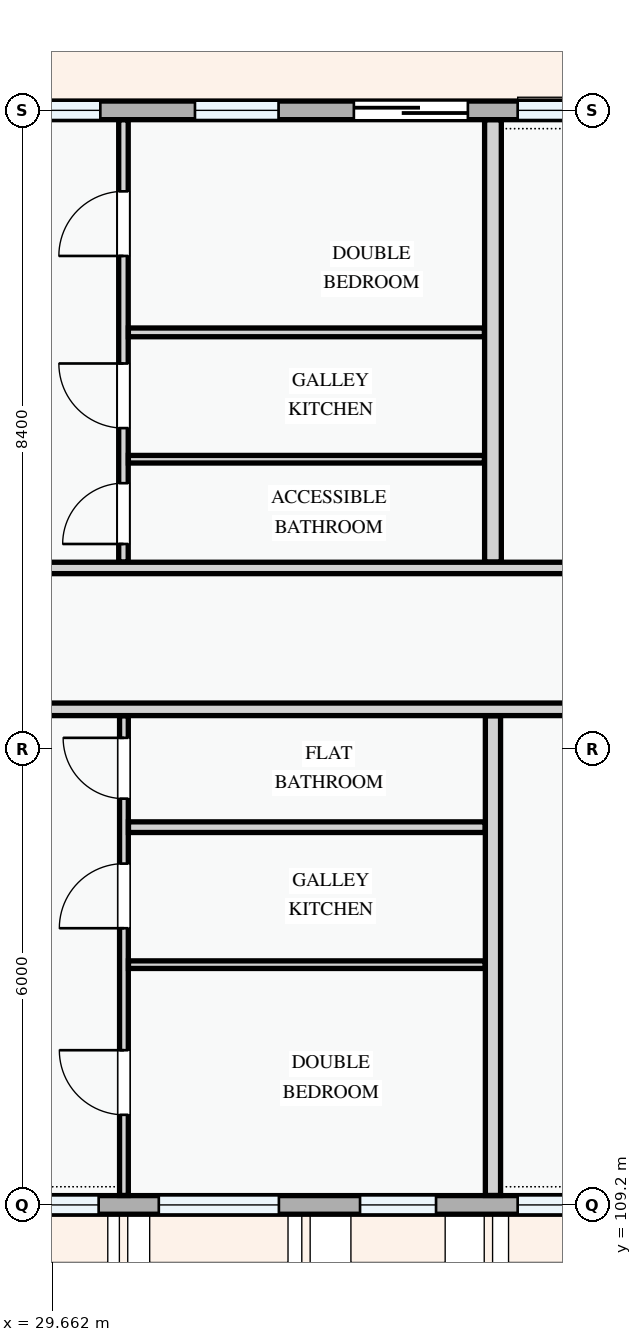
"""IFC4 building model, lengths in metres.
Left out: names, types, materials, properties, quantities, classifications, styles, units other than length and angle.
Written with IfcOpenShell. Run it as: python <this file> out.ifc"""

import sys

from ifc_helpers import new_model, si_unit, direction, frame, frame_2d, origin, place, context, subcontext, project, spatial, rectangle, extrude, element, fill, save


model = new_model("IFC4")
c1 = context("Model", 3, precision=1e-05, world=origin(), true_north=direction((0.0, 1.0)))
c2 = subcontext(c1, "Body", "Model", "MODEL_VIEW")
j1 = project(units=[si_unit("LENGTHUNIT", "METRE"), si_unit("PLANEANGLEUNIT", "RADIAN")], contexts=[c1])
p1 = place(None, origin())
s1 = spatial("IfcSite", under=j1, at=p1, CompositionType="ELEMENT")
p2 = place(p1, origin())
s2 = spatial("IfcBuilding", under=s1, at=p2, CompositionType="ELEMENT")
p3 = place(p2, frame((0.0, 0.0, 8.1)))
s3 = spatial("IfcBuildingStorey", under=s2, at=p3, CompositionType="ELEMENT", Elevation=8.1)
p4 = place(p3, frame((28.8, 109.2, 0.0), z_axis=(0.0, 0.0, 1.0), x_axis=(1.0, 0.0, 0.0)))
e1 = element("IfcWall", 1, at=p4, inside=s3, PredefinedType="STANDARD", context=c2, shape_type="SweptSolid", body=[
    extrude(rectangle(XDim=8.4, YDim=0.245, at=frame_2d((4.2, 0.0))), origin(), (0.0, 0.0, 1.0), 2.375),
])
p5 = place(p4, frame((0.522, 0.0, 0.78)))
e2 = element("IfcOpeningElement", 2, at=p5, cuts=e1, PredefinedType="OPENING", context=c2, shape_type="SweptSolid", body=[
    extrude(rectangle(XDim=0.95, YDim=1.15, at=frame_2d((0.475, 0.575))), frame((0.0, 0.133, 0.0), z_axis=(0.0, -1.0, 0.0), x_axis=(1.0, 0.0, 0.0)), (0.0, 0.0, 1.0), 0.265),
])
p6 = place(p4, frame((2.264, 0.0, 0.78)))
e3 = element("IfcOpeningElement", 3, at=p6, cuts=e1, PredefinedType="OPENING", context=c2, shape_type="SweptSolid", body=[
    extrude(rectangle(XDim=1.58, YDim=1.48, at=frame_2d((0.79, 0.74))), frame((0.0, 0.133, 0.0), z_axis=(0.0, -1.0, 0.0), x_axis=(1.0, 0.0, 0.0)), (0.0, 0.0, 1.0), 0.265),
])
p7 = place(p4, frame((4.911, 0.0, 0.78)))
e4 = element("IfcOpeningElement", 4, at=p7, cuts=e1, PredefinedType="OPENING", context=c2, shape_type="SweptSolid", body=[
    extrude(rectangle(XDim=1.0, YDim=1.25, at=frame_2d((0.5, 0.625))), frame((0.0, 0.133, 0.0), z_axis=(0.0, -1.0, 0.0), x_axis=(1.0, 0.0, 0.0)), (0.0, 0.0, 1.0), 0.265),
])
p8 = place(p4, frame((6.985, 0.0, 0.78)))
e5 = element("IfcOpeningElement", 5, at=p8, cuts=e1, PredefinedType="OPENING", context=c2, shape_type="SweptSolid", body=[
    extrude(rectangle(XDim=0.9, YDim=1.2, at=frame_2d((0.45, 0.6))), frame((0.0, 0.133, 0.0), z_axis=(0.0, -1.0, 0.0), x_axis=(1.0, 0.0, 0.0)), (0.0, 0.0, 1.0), 0.265),
])
p9 = place(p3, frame((37.2, 123.6, 0.0), z_axis=(0.0, 0.0, 1.0), x_axis=(-1.0, 0.0, 0.0)))
e6 = element("IfcWall", 6, at=p9, inside=s3, PredefinedType="STANDARD", context=c2, shape_type="SweptSolid", body=[
    extrude(rectangle(XDim=8.4, YDim=0.245, at=frame_2d((4.2, 0.0))), origin(), (0.0, 0.0, 1.0), 2.345),
])
p10 = place(p9, frame((2.07, 0.0, 0.0)))
e7 = element("IfcOpeningElement", 7, at=p10, cuts=e6, PredefinedType="OPENING", context=c2, shape_type="SweptSolid", body=[
    extrude(rectangle(XDim=1.5, YDim=2.2, at=frame_2d((0.75, 1.1))), frame((0.0, 0.133, 0.0), z_axis=(0.0, -1.0, 0.0), x_axis=(1.0, 0.0, 0.0)), (0.0, 0.0, 1.0), 0.265),
])
p11 = place(p9, frame((0.515, 0.0, 0.78)))
e8 = element("IfcOpeningElement", 8, at=p11, cuts=e6, PredefinedType="OPENING", context=c2, shape_type="SweptSolid", body=[
    extrude(rectangle(XDim=0.9, YDim=1.2, at=frame_2d((0.45, 0.6))), frame((0.0, 0.133, 0.0), z_axis=(0.0, -1.0, 0.0), x_axis=(1.0, 0.0, 0.0)), (0.0, 0.0, 1.0), 0.265),
])
p12 = place(p9, frame((4.561, 0.0, 0.78)))
e9 = element("IfcOpeningElement", 9, at=p12, cuts=e6, PredefinedType="OPENING", context=c2, shape_type="SweptSolid", body=[
    extrude(rectangle(XDim=1.1, YDim=1.3, at=frame_2d((0.55, 0.65))), frame((0.0, 0.133, 0.0), z_axis=(0.0, -1.0, 0.0), x_axis=(1.0, 0.0, 0.0)), (0.0, 0.0, 1.0), 0.265),
])
p13 = place(p9, frame((6.906, 0.0, 0.78)))
e10 = element("IfcOpeningElement", 10, at=p13, cuts=e6, PredefinedType="OPENING", context=c2, shape_type="SweptSolid", body=[
    extrude(rectangle(XDim=1.0, YDim=1.25, at=frame_2d((0.5, 0.625))), frame((0.0, 0.133, 0.0), z_axis=(0.0, -1.0, 0.0), x_axis=(1.0, 0.0, 0.0)), (0.0, 0.0, 1.0), 0.265),
])
p14 = place(p3, frame((30.605, 109.324, 0.0), z_axis=(0.0, 0.0, 1.0), x_axis=(0.0, 1.0, 0.0)))
e11 = element("IfcWall", 11, at=p14, inside=s3, PredefinedType="PARTITIONING", context=c2, shape_type="SweptSolid", body=[
    extrude(rectangle(XDim=6.311, YDim=0.115, at=frame_2d((3.156, 0.0))), origin(), (0.0, 0.0, 1.0), 3.0),
])
p15 = place(p14, frame((1.061, 0.0, 0.0)))
e12 = element("IfcOpeningElement", 12, at=p15, cuts=e11, PredefinedType="OPENING", context=c2, shape_type="SweptSolid", body=[
    extrude(rectangle(XDim=0.85, YDim=2.1, at=frame_2d((0.425, 1.05))), frame((0.0, 0.067, 0.0), z_axis=(0.0, -1.0, 0.0), x_axis=(1.0, 0.0, 0.0)), (0.0, 0.0, 1.0), 0.135),
])
p16 = place(p14, frame((3.516, 0.0, 0.0)))
e13 = element("IfcOpeningElement", 13, at=p16, cuts=e11, PredefinedType="OPENING", context=c2, shape_type="SweptSolid", body=[
    extrude(rectangle(XDim=0.85, YDim=2.1, at=frame_2d((0.425, 1.05))), frame((0.0, 0.067, 0.0), z_axis=(0.0, -1.0, 0.0), x_axis=(1.0, 0.0, 0.0)), (0.0, 0.0, 1.0), 0.135),
])
p17 = place(p14, frame((5.22, 0.0, 0.0)))
e14 = element("IfcOpeningElement", 14, at=p17, cuts=e11, PredefinedType="OPENING", context=c2, shape_type="SweptSolid", body=[
    extrude(rectangle(XDim=0.8, YDim=2.1, at=frame_2d((0.4, 1.05))), frame((0.0, 0.067, 0.0), z_axis=(0.0, -1.0, 0.0), x_axis=(1.0, 0.0, 0.0)), (0.0, 0.0, 1.0), 0.135),
])
p18 = place(p3, frame((30.665, 112.361, 0.0), z_axis=(0.0, 0.0, 1.0), x_axis=(1.0, 0.0, 0.0)))
e15 = element("IfcWall", 15, at=p18, inside=s3, PredefinedType="PARTITIONING", context=c2, shape_type="SweptSolid", body=[
    extrude(rectangle(XDim=4.693, YDim=0.1, at=frame_2d((2.347, 0.0))), origin(), (0.0, 0.0, 1.0), 3.0),
])
p19 = place(p3, frame((30.665, 114.17, 0.0), z_axis=(0.0, 0.0, 1.0), x_axis=(1.0, 0.0, 0.0)))
e16 = element("IfcWall", 16, at=p19, inside=s3, PredefinedType="PARTITIONING", context=c2, shape_type="SweptSolid", body=[
    extrude(rectangle(XDim=4.693, YDim=0.14, at=frame_2d((2.347, 0.0))), origin(), (0.0, 0.0, 1.0), 3.0),
])
p20 = place(p3, frame((30.599, 117.657, 0.0), z_axis=(0.0, 0.0, 1.0), x_axis=(0.0, 1.0, 0.0)))
e17 = element("IfcWall", 17, at=p20, inside=s3, PredefinedType="PARTITIONING", context=c2, shape_type="SweptSolid", body=[
    extrude(rectangle(XDim=5.819, YDim=0.125, at=frame_2d((2.909, 0.0))), origin(), (0.0, 0.0, 1.0), 3.0),
])
p21 = place(p20, frame((0.238, 0.0, 0.0)))
e18 = element("IfcOpeningElement", 18, at=p21, cuts=e17, PredefinedType="OPENING", context=c2, shape_type="SweptSolid", body=[
    extrude(rectangle(XDim=0.8, YDim=2.1, at=frame_2d((0.4, 1.05))), frame((0.0, 0.073, 0.0), z_axis=(0.0, -1.0, 0.0), x_axis=(1.0, 0.0, 0.0)), (0.0, 0.0, 1.0), 0.145),
])
p22 = place(p20, frame((1.763, 0.0, 0.0)))
e19 = element("IfcOpeningElement", 19, at=p22, cuts=e17, PredefinedType="OPENING", context=c2, shape_type="SweptSolid", body=[
    extrude(rectangle(XDim=0.85, YDim=2.1, at=frame_2d((0.425, 1.05))), frame((0.0, 0.073, 0.0), z_axis=(0.0, -1.0, 0.0), x_axis=(1.0, 0.0, 0.0)), (0.0, 0.0, 1.0), 0.145),
])
p23 = place(p20, frame((4.028, 0.0, 0.0)))
e20 = element("IfcOpeningElement", 20, at=p23, cuts=e17, PredefinedType="OPENING", context=c2, shape_type="SweptSolid", body=[
    extrude(rectangle(XDim=0.85, YDim=2.1, at=frame_2d((0.425, 1.05))), frame((0.0, 0.073, 0.0), z_axis=(0.0, -1.0, 0.0), x_axis=(1.0, 0.0, 0.0)), (0.0, 0.0, 1.0), 0.145),
])
p24 = place(p3, frame((30.663, 120.679, 0.0), z_axis=(0.0, 0.0, 1.0), x_axis=(1.0, 0.0, 0.0)))
e21 = element("IfcWall", 21, at=p24, inside=s3, PredefinedType="PARTITIONING", context=c2, shape_type="SweptSolid", body=[
    extrude(rectangle(XDim=4.685, YDim=0.115, at=frame_2d((2.342, 0.0))), origin(), (0.0, 0.0, 1.0), 3.0),
])
p25 = place(p3, frame((30.663, 119.01, 0.0), z_axis=(0.0, 0.0, 1.0), x_axis=(1.0, 0.0, 0.0)))
e22 = element("IfcWall", 22, at=p25, inside=s3, PredefinedType="PARTITIONING", context=c2, shape_type="SweptSolid", body=[
    extrude(rectangle(XDim=4.685, YDim=0.1, at=frame_2d((2.342, 0.0))), origin(), (0.0, 0.0, 1.0), 3.0),
])
p26 = place(p3, frame((35.46, 109.324, 0.0), z_axis=(0.0, 0.0, 1.0), x_axis=(0.0, 1.0, 0.0)))
e23 = element("IfcWall", 23, at=p26, inside=s3, PredefinedType="PARTITIONING", context=c2, shape_type="SweptSolid", body=[
    extrude(rectangle(XDim=6.311, YDim=0.2, at=frame_2d((3.156, 0.0))), origin(), (0.0, 0.0, 1.0), 3.0),
])
p27 = place(p3, frame((35.46, 117.657, 0.0), z_axis=(0.0, 0.0, 1.0), x_axis=(0.0, 1.0, 0.0)))
e24 = element("IfcWall", 24, at=p27, inside=s3, PredefinedType="PARTITIONING", context=c2, shape_type="SweptSolid", body=[
    extrude(rectangle(XDim=5.819, YDim=0.22, at=frame_2d((2.909, 0.0))), origin(), (0.0, 0.0, 1.0), 3.0),
])
p28 = place(p3, frame((25.15, 115.72, 0.0), z_axis=(0.0, 0.0, 1.0), x_axis=(1.0, 0.0, 0.0)))
e25 = element("IfcWall", 25, at=p28, inside=s3, PredefinedType="PARTITIONING", context=c2, shape_type="SweptSolid", body=[
    extrude(rectangle(XDim=32.326, YDim=0.165, at=frame_2d((16.163, 0.0))), origin(), (0.0, 0.0, 1.0), 3.0),
])
p29 = place(p28, frame((0.25, 0.0, 0.0)))
e26 = element("IfcOpeningElement", 26, at=p29, cuts=e25, PredefinedType="OPENING", context=c2, shape_type="SweptSolid", body=[
    extrude(rectangle(XDim=0.92, YDim=2.1, at=frame_2d((0.46, 1.05))), frame((0.0, 0.093, 0.0), z_axis=(0.0, -1.0, 0.0), x_axis=(1.0, 0.0, 0.0)), (0.0, 0.0, 1.0), 0.185),
])
p30 = place(p28, frame((14.548, 0.0, 0.0)))
e27 = element("IfcOpeningElement", 27, at=p30, cuts=e25, PredefinedType="OPENING", context=c2, shape_type="SweptSolid", body=[
    extrude(rectangle(XDim=0.92, YDim=2.1, at=frame_2d((0.46, 1.05))), frame((0.0, 0.093, 0.0), z_axis=(0.0, -1.0, 0.0), x_axis=(1.0, 0.0, 0.0)), (0.0, 0.0, 1.0), 0.185),
])
p31 = place(p28, frame((22.28, 0.0, 0.0)))
e28 = element("IfcOpeningElement", 28, at=p31, cuts=e25, PredefinedType="OPENING", context=c2, shape_type="SweptSolid", body=[
    extrude(rectangle(XDim=0.92, YDim=2.1, at=frame_2d((0.46, 1.05))), frame((0.0, 0.093, 0.0), z_axis=(0.0, -1.0, 0.0), x_axis=(1.0, 0.0, 0.0)), (0.0, 0.0, 1.0), 0.185),
])
p32 = place(p3, frame((22.66, 117.58, 0.0), z_axis=(0.0, 0.0, 1.0), x_axis=(1.0, 0.0, 0.0)))
e29 = element("IfcWall", 29, at=p32, inside=s3, PredefinedType="PARTITIONING", context=c2, shape_type="SweptSolid", body=[
    extrude(rectangle(XDim=34.816, YDim=0.15, at=frame_2d((17.408, 0.0))), origin(), (0.0, 0.0, 1.0), 3.0),
])
p33 = place(p32, frame((2.74, 0.0, 0.0)))
e30 = element("IfcOpeningElement", 30, at=p33, cuts=e29, PredefinedType="OPENING", context=c2, shape_type="SweptSolid", body=[
    extrude(rectangle(XDim=0.92, YDim=2.1, at=frame_2d((0.46, 1.05))), frame((0.0, 0.085, 0.0), z_axis=(0.0, -1.0, 0.0), x_axis=(1.0, 0.0, 0.0)), (0.0, 0.0, 1.0), 0.17),
])
p34 = place(p32, frame((17.085, 0.0, 0.0)))
e31 = element("IfcOpeningElement", 31, at=p34, cuts=e29, PredefinedType="OPENING", context=c2, shape_type="SweptSolid", body=[
    extrude(rectangle(XDim=0.96, YDim=2.12, at=frame_2d((0.48, 1.06))), frame((0.0, 0.085, 0.0), z_axis=(0.0, -1.0, 0.0), x_axis=(1.0, 0.0, 0.0)), (0.0, 0.0, 1.0), 0.17),
])
p35 = place(p32, frame((24.77, 0.0, 0.0)))
e32 = element("IfcOpeningElement", 32, at=p35, cuts=e29, PredefinedType="OPENING", context=c2, shape_type="SweptSolid", body=[
    extrude(rectangle(XDim=0.92, YDim=2.1, at=frame_2d((0.46, 1.05))), frame((0.0, 0.085, 0.0), z_axis=(0.0, -1.0, 0.0), x_axis=(1.0, 0.0, 0.0)), (0.0, 0.0, 1.0), 0.17),
])
p36 = place(p5, origin())
e33 = element("IfcWindow", 33, at=p36, inside=s3, PartitioningType="SINGLE_PANEL", PredefinedType="WINDOW", context=c2, shape_type="SweptSolid", body=[
    extrude(rectangle(XDim=0.95, YDim=1.15, at=frame_2d((0.475, 0.575))), frame((0.0, 0.03, 0.0), z_axis=(0.0, -1.0, 0.0), x_axis=(1.0, 0.0, 0.0)), (0.0, 0.0, 1.0), 0.06),
])
fill(e2, e33)
p37 = place(p6, origin())
e34 = element("IfcWindow", 34, at=p37, inside=s3, PartitioningType="SINGLE_PANEL", PredefinedType="WINDOW", context=c2, shape_type="SweptSolid", body=[
    extrude(rectangle(XDim=1.58, YDim=1.48, at=frame_2d((0.79, 0.74))), frame((0.0, 0.03, 0.0), z_axis=(0.0, -1.0, 0.0), x_axis=(1.0, 0.0, 0.0)), (0.0, 0.0, 1.0), 0.06),
])
fill(e3, e34)
p38 = place(p7, origin())
e35 = element("IfcWindow", 35, at=p38, inside=s3, PartitioningType="SINGLE_PANEL", PredefinedType="WINDOW", context=c2, shape_type="SweptSolid", body=[
    extrude(rectangle(XDim=1.0, YDim=1.25, at=frame_2d((0.5, 0.625))), frame((0.0, 0.03, 0.0), z_axis=(0.0, -1.0, 0.0), x_axis=(1.0, 0.0, 0.0)), (0.0, 0.0, 1.0), 0.06),
])
fill(e4, e35)
p39 = place(p8, origin())
e36 = element("IfcWindow", 36, at=p39, inside=s3, PartitioningType="SINGLE_PANEL", PredefinedType="WINDOW", context=c2, shape_type="SweptSolid", body=[
    extrude(rectangle(XDim=0.9, YDim=1.2, at=frame_2d((0.45, 0.6))), frame((0.0, 0.03, 0.0), z_axis=(0.0, -1.0, 0.0), x_axis=(1.0, 0.0, 0.0)), (0.0, 0.0, 1.0), 0.06),
])
fill(e5, e36)
p40 = place(p10, frame((1.5, 0.0, 0.0), z_axis=(0.0, 0.0, 1.0), x_axis=(-1.0, 0.0, 0.0)))
e37 = element("IfcDoor", 37, at=p40, inside=s3, OperationType="SLIDING_TO_RIGHT", PredefinedType="DOOR", context=c2, shape_type="SweptSolid", body=[
    extrude(rectangle(XDim=1.5, YDim=2.2, at=frame_2d((0.75, 1.1))), frame((0.0, 0.025, 0.0), z_axis=(0.0, -1.0, 0.0), x_axis=(1.0, 0.0, 0.0)), (0.0, 0.0, 1.0), 0.05),
])
fill(e7, e37)
p41 = place(p11, origin())
e38 = element("IfcWindow", 38, at=p41, inside=s3, PartitioningType="SINGLE_PANEL", PredefinedType="WINDOW", context=c2, shape_type="SweptSolid", body=[
    extrude(rectangle(XDim=0.9, YDim=1.2, at=frame_2d((0.45, 0.6))), frame((0.0, 0.03, 0.0), z_axis=(0.0, -1.0, 0.0), x_axis=(1.0, 0.0, 0.0)), (0.0, 0.0, 1.0), 0.06),
])
fill(e8, e38)
p42 = place(p12, origin())
e39 = element("IfcWindow", 39, at=p42, inside=s3, PartitioningType="SINGLE_PANEL", PredefinedType="WINDOW", context=c2, shape_type="SweptSolid", body=[
    extrude(rectangle(XDim=1.1, YDim=1.3, at=frame_2d((0.55, 0.65))), frame((0.0, 0.03, 0.0), z_axis=(0.0, -1.0, 0.0), x_axis=(1.0, 0.0, 0.0)), (0.0, 0.0, 1.0), 0.06),
])
fill(e9, e39)
p43 = place(p13, origin())
e40 = element("IfcWindow", 40, at=p43, inside=s3, PartitioningType="SINGLE_PANEL", PredefinedType="WINDOW", context=c2, shape_type="SweptSolid", body=[
    extrude(rectangle(XDim=1.0, YDim=1.25, at=frame_2d((0.5, 0.625))), frame((0.0, 0.03, 0.0), z_axis=(0.0, -1.0, 0.0), x_axis=(1.0, 0.0, 0.0)), (0.0, 0.0, 1.0), 0.06),
])
fill(e10, e40)
p44 = place(p15, origin())
e41 = element("IfcDoor", 41, at=p44, inside=s3, OperationType="SINGLE_SWING_RIGHT", PredefinedType="DOOR", context=c2, shape_type="SweptSolid", body=[
    extrude(rectangle(XDim=0.85, YDim=2.1, at=frame_2d((0.425, 1.05))), frame((0.0, 0.025, 0.0), z_axis=(0.0, -1.0, 0.0), x_axis=(1.0, 0.0, 0.0)), (0.0, 0.0, 1.0), 0.05),
])
fill(e12, e41)
p45 = place(p16, origin())
e42 = element("IfcDoor", 42, at=p45, inside=s3, OperationType="SINGLE_SWING_LEFT", PredefinedType="DOOR", context=c2, shape_type="SweptSolid", body=[
    extrude(rectangle(XDim=0.85, YDim=2.1, at=frame_2d((0.425, 1.05))), frame((0.0, 0.025, 0.0), z_axis=(0.0, -1.0, 0.0), x_axis=(1.0, 0.0, 0.0)), (0.0, 0.0, 1.0), 0.05),
])
fill(e13, e42)
p46 = place(p17, origin())
e43 = element("IfcDoor", 43, at=p46, inside=s3, OperationType="SINGLE_SWING_RIGHT", PredefinedType="DOOR", context=c2, shape_type="SweptSolid", body=[
    extrude(rectangle(XDim=0.8, YDim=2.1, at=frame_2d((0.4, 1.05))), frame((0.0, 0.025, 0.0), z_axis=(0.0, -1.0, 0.0), x_axis=(1.0, 0.0, 0.0)), (0.0, 0.0, 1.0), 0.05),
])
fill(e14, e43)
p47 = place(p21, origin())
e44 = element("IfcDoor", 44, at=p47, inside=s3, OperationType="SINGLE_SWING_LEFT", PredefinedType="DOOR", context=c2, shape_type="SweptSolid", body=[
    extrude(rectangle(XDim=0.8, YDim=2.1, at=frame_2d((0.4, 1.05))), frame((0.0, 0.025, 0.0), z_axis=(0.0, -1.0, 0.0), x_axis=(1.0, 0.0, 0.0)), (0.0, 0.0, 1.0), 0.05),
])
fill(e18, e44)
p48 = place(p22, origin())
e45 = element("IfcDoor", 45, at=p48, inside=s3, OperationType="SINGLE_SWING_RIGHT", PredefinedType="DOOR", context=c2, shape_type="SweptSolid", body=[
    extrude(rectangle(XDim=0.85, YDim=2.1, at=frame_2d((0.425, 1.05))), frame((0.0, 0.025, 0.0), z_axis=(0.0, -1.0, 0.0), x_axis=(1.0, 0.0, 0.0)), (0.0, 0.0, 1.0), 0.05),
])
fill(e19, e45)
p49 = place(p23, origin())
e46 = element("IfcDoor", 46, at=p49, inside=s3, OperationType="SINGLE_SWING_LEFT", PredefinedType="DOOR", context=c2, shape_type="SweptSolid", body=[
    extrude(rectangle(XDim=0.85, YDim=2.1, at=frame_2d((0.425, 1.05))), frame((0.0, 0.025, 0.0), z_axis=(0.0, -1.0, 0.0), x_axis=(1.0, 0.0, 0.0)), (0.0, 0.0, 1.0), 0.05),
])
fill(e20, e46)
save(model, sys.argv[1])
